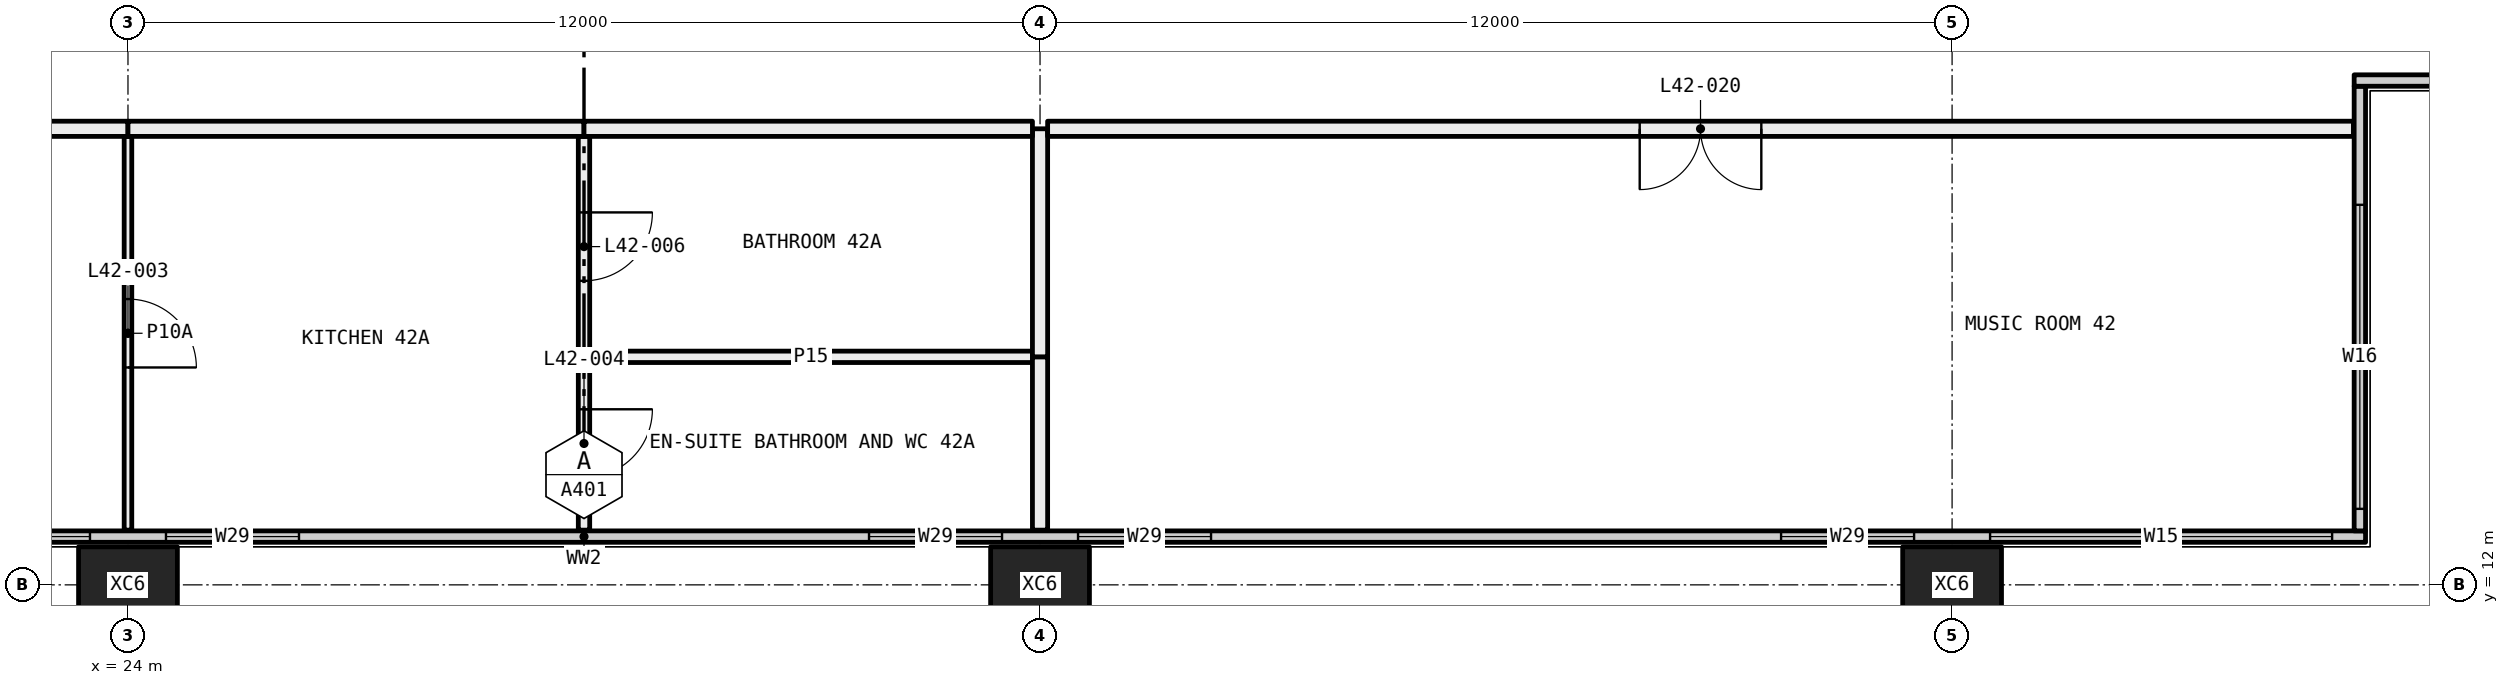
"""IFC4 building model, lengths in metres.
Left out: names, types, materials, properties, quantities, classifications, styles, units other than length and angle.
Written with IfcOpenShell. Run it as: python <this file> out.ifc"""

import sys

from ifc_helpers import new_model, si_unit, direction, frame, frame_2d, origin, origin_2d, place, context, subcontext, project, spatial, rectangle, hollow_rectangle, extrude, element, fill, save


model = new_model("IFC4")
c1 = context("Model", 3, precision=1e-05, world=origin(), true_north=direction((0.0, 1.0)))
c2 = subcontext(c1, "Body", "Model", "MODEL_VIEW")
j1 = project(units=[si_unit("LENGTHUNIT", "METRE"), si_unit("PLANEANGLEUNIT", "RADIAN")], contexts=[c1])
p1 = place(None, origin())
s1 = spatial("IfcSite", under=j1, at=p1, CompositionType="ELEMENT")
p2 = place(p1, origin())
s2 = spatial("IfcBuilding", under=s1, at=p2, CompositionType="ELEMENT")
p3 = place(p2, frame((0.0, 0.0, 161.7)))
s3 = spatial("IfcBuildingStorey", under=s2, at=p3, CompositionType="ELEMENT", Elevation=161.7)
for number, where, z_axis, x_axis in (
    (1, (24.0, 12.0, -0.4), (0.0, 0.0, 1.0), (1.0, 0.0, 0.0)),
    (2, (36.0, 12.0, -0.4), (0.0, 0.0, 1.0), (1.0, 0.0, 0.0)),
    (3, (48.0, 12.0, -0.4), (0.0, 0.0, 1.0), (1.0, 0.0, 0.0)),
):
    element("IfcColumn", number, at=place(p3, frame(where, z_axis=z_axis, x_axis=x_axis)), inside=s3, PredefinedType="COLUMN", context=c2, shape_type="SweptSolid", body=[
        extrude(hollow_rectangle(XDim=1.3, YDim=1.0, WallThickness=0.05, at=origin_2d()), origin(), (0.0, 0.0, 1.0), 3.45),
    ])
p4 = place(p3, frame((6.56, 12.635, 0.0), z_axis=(0.0, 0.0, 1.0), x_axis=(1.0, 0.0, 0.0)))
e4 = element("IfcWall", 4, at=p4, inside=s3, PredefinedType="ELEMENTEDWALL", context=c2, shape_type="SweptSolid", body=[
    extrude(rectangle(XDim=46.88, YDim=0.15, at=frame_2d((23.44, 0.0))), origin(), (0.0, 0.0, 1.0), 3.05),
])
p5 = place(p4, frame((0.44, 0.0, 0.45)))
e5 = element("IfcOpeningElement", 5, at=p5, cuts=e4, PredefinedType="OPENING", context=c2, shape_type="SweptSolid", body=[
    extrude(rectangle(XDim=4.5, YDim=2.55, at=frame_2d((2.25, 1.275))), frame((0.0, 0.085, 0.0), z_axis=(0.0, -1.0, 0.0), x_axis=(1.0, 0.0, 0.0)), (0.0, 0.0, 1.0), 0.17),
])
p6 = place(p4, frame((5.94, 0.0, 0.45)))
e6 = element("IfcOpeningElement", 6, at=p6, cuts=e4, PredefinedType="OPENING", context=c2, shape_type="SweptSolid", body=[
    extrude(rectangle(XDim=1.75, YDim=2.55, at=frame_2d((0.875, 1.275))), frame((0.0, 0.085, 0.0), z_axis=(0.0, -1.0, 0.0), x_axis=(1.0, 0.0, 0.0)), (0.0, 0.0, 1.0), 0.17),
])
p7 = place(p4, frame((15.19, 0.0, 0.45)))
e7 = element("IfcOpeningElement", 7, at=p7, cuts=e4, PredefinedType="OPENING", context=c2, shape_type="SweptSolid", body=[
    extrude(rectangle(XDim=1.75, YDim=2.55, at=frame_2d((0.875, 1.275))), frame((0.0, 0.085, 0.0), z_axis=(0.0, -1.0, 0.0), x_axis=(1.0, 0.0, 0.0)), (0.0, 0.0, 1.0), 0.17),
])
p8 = place(p4, frame((17.94, 0.0, 0.45)))
e8 = element("IfcOpeningElement", 8, at=p8, cuts=e4, PredefinedType="OPENING", context=c2, shape_type="SweptSolid", body=[
    extrude(rectangle(XDim=1.75, YDim=2.55, at=frame_2d((0.875, 1.275))), frame((0.0, 0.085, 0.0), z_axis=(0.0, -1.0, 0.0), x_axis=(1.0, 0.0, 0.0)), (0.0, 0.0, 1.0), 0.17),
])
p9 = place(p4, frame((27.19, 0.0, 0.45)))
e9 = element("IfcOpeningElement", 9, at=p9, cuts=e4, PredefinedType="OPENING", context=c2, shape_type="SweptSolid", body=[
    extrude(rectangle(XDim=1.75, YDim=2.55, at=frame_2d((0.875, 1.275))), frame((0.0, 0.085, 0.0), z_axis=(0.0, -1.0, 0.0), x_axis=(1.0, 0.0, 0.0)), (0.0, 0.0, 1.0), 0.17),
])
p10 = place(p4, frame((29.94, 0.0, 0.45)))
e10 = element("IfcOpeningElement", 10, at=p10, cuts=e4, PredefinedType="OPENING", context=c2, shape_type="SweptSolid", body=[
    extrude(rectangle(XDim=1.75, YDim=2.55, at=frame_2d((0.875, 1.275))), frame((0.0, 0.085, 0.0), z_axis=(0.0, -1.0, 0.0), x_axis=(1.0, 0.0, 0.0)), (0.0, 0.0, 1.0), 0.17),
])
p11 = place(p4, frame((39.19, 0.0, 0.45)))
e11 = element("IfcOpeningElement", 11, at=p11, cuts=e4, PredefinedType="OPENING", context=c2, shape_type="SweptSolid", body=[
    extrude(rectangle(XDim=1.75, YDim=2.55, at=frame_2d((0.875, 1.275))), frame((0.0, 0.085, 0.0), z_axis=(0.0, -1.0, 0.0), x_axis=(1.0, 0.0, 0.0)), (0.0, 0.0, 1.0), 0.17),
])
p12 = place(p4, frame((41.94, 0.0, 0.45)))
e12 = element("IfcOpeningElement", 12, at=p12, cuts=e4, PredefinedType="OPENING", context=c2, shape_type="SweptSolid", body=[
    extrude(rectangle(XDim=4.5, YDim=2.55, at=frame_2d((2.25, 1.275))), frame((0.0, 0.085, 0.0), z_axis=(0.0, -1.0, 0.0), x_axis=(1.0, 0.0, 0.0)), (0.0, 0.0, 1.0), 0.17),
])
p13 = place(p3, frame((53.365, 12.71, 0.0), z_axis=(0.0, 0.0, 1.0), x_axis=(0.0, 1.0, 0.0)))
e13 = element("IfcWall", 13, at=p13, inside=s3, PredefinedType="ELEMENTEDWALL", context=c2, shape_type="SweptSolid", body=[
    extrude(rectangle(XDim=5.85, YDim=0.15, at=frame_2d((2.925, 0.0))), origin(), (0.0, 0.0, 1.0), 3.05),
])
p14 = place(p13, frame((0.29, 0.0, 0.45)))
e14 = element("IfcOpeningElement", 14, at=p14, cuts=e13, PredefinedType="OPENING", context=c2, shape_type="SweptSolid", body=[
    extrude(rectangle(XDim=4.0, YDim=2.55, at=frame_2d((2.0, 1.275))), frame((0.0, 0.085, 0.0), z_axis=(0.0, -1.0, 0.0), x_axis=(1.0, 0.0, 0.0)), (0.0, 0.0, 1.0), 0.17),
])
p15 = place(p3, frame((53.29, 18.635, 0.0), z_axis=(0.0, 0.0, 1.0), x_axis=(1.0, 0.0, 0.0)))
e15 = element("IfcWall", 15, at=p15, inside=s3, PredefinedType="ELEMENTEDWALL", context=c2, shape_type="SweptSolid", body=[
    extrude(rectangle(XDim=6.15, YDim=0.15, at=frame_2d((3.075, 0.0))), origin(), (0.0, 0.0, 1.0), 3.05),
])
p16 = place(p15, frame((1.71, 0.0, 0.45)))
e16 = element("IfcOpeningElement", 16, at=p16, cuts=e15, PredefinedType="OPENING", context=c2, shape_type="SweptSolid", body=[
    extrude(rectangle(XDim=4.0, YDim=2.55, at=frame_2d((2.0, 1.275))), frame((0.0, 0.085, 0.0), z_axis=(0.0, -1.0, 0.0), x_axis=(1.0, 0.0, 0.0)), (0.0, 0.0, 1.0), 0.17),
])
p17 = place(p3, frame((24.0, 12.72, 0.0), z_axis=(0.0, 0.0, 1.0), x_axis=(0.0, 1.0, 0.0)))
e17 = element("IfcWall", 17, at=p17, inside=s3, PredefinedType="PARTITIONING", context=c2, shape_type="SweptSolid", body=[
    extrude(rectangle(XDim=5.18, YDim=0.1, at=frame_2d((2.59, 0.0))), origin(), (0.0, 0.0, 1.0), 3.05),
])
p18 = place(p17, frame((2.14, 0.0, 0.0)))
e18 = element("IfcOpeningElement", 18, at=p18, cuts=e17, PredefinedType="OPENING", context=c2, shape_type="SweptSolid", body=[
    extrude(rectangle(XDim=0.9, YDim=2.1, at=frame_2d((0.45, 1.05))), frame((0.0, 0.06, 0.0), z_axis=(0.0, -1.0, 0.0), x_axis=(1.0, 0.0, 0.0)), (0.0, 0.0, 1.0), 0.12),
])
p19 = place(p3, frame((24.0, 18.0, 0.0), z_axis=(0.0, 0.0, 1.0), x_axis=(-1.0, 0.0, 0.0)))
e19 = element("IfcWall", 19, at=p19, inside=s3, PredefinedType="PARTITIONING", context=c2, shape_type="SweptSolid", body=[
    extrude(rectangle(XDim=6.0, YDim=0.2, at=frame_2d((3.0, 0.0))), origin(), (0.0, 0.0, 1.0), 3.05),
])
p20 = place(p19, frame((2.5, 0.0, 0.0)))
e20 = element("IfcOpeningElement", 20, at=p20, cuts=e19, PredefinedType="OPENING", context=c2, shape_type="SweptSolid", body=[
    extrude(rectangle(XDim=1.0, YDim=2.1, at=frame_2d((0.5, 1.05))), frame((0.0, 0.11, 0.0), z_axis=(0.0, -1.0, 0.0), x_axis=(1.0, 0.0, 0.0)), (0.0, 0.0, 1.0), 0.22),
])
p21 = place(p3, frame((30.0, 12.72, 0.0), z_axis=(0.0, 0.0, 1.0), x_axis=(0.0, 1.0, 0.0)))
e21 = element("IfcWall", 21, at=p21, inside=s3, PredefinedType="PARTITIONING", context=c2, shape_type="SweptSolid", body=[
    extrude(rectangle(XDim=2.28, YDim=0.15, at=frame_2d((1.14, 0.0))), origin(), (0.0, 0.0, 1.0), 3.05),
])
p22 = place(p21, frame((0.69, 0.0, 0.0)))
e22 = element("IfcOpeningElement", 22, at=p22, cuts=e21, PredefinedType="OPENING", context=c2, shape_type="SweptSolid", body=[
    extrude(rectangle(XDim=0.9, YDim=2.1, at=frame_2d((0.45, 1.05))), frame((0.0, 0.085, 0.0), z_axis=(0.0, -1.0, 0.0), x_axis=(1.0, 0.0, 0.0)), (0.0, 0.0, 1.0), 0.17),
])
p23 = place(p3, frame((30.0, 15.0, 0.0), z_axis=(0.0, 0.0, 1.0), x_axis=(0.0, 1.0, 0.0)))
e23 = element("IfcWall", 23, at=p23, inside=s3, PredefinedType="PARTITIONING", context=c2, shape_type="SweptSolid", body=[
    extrude(rectangle(XDim=2.9, YDim=0.15, at=frame_2d((1.45, 0.0))), origin(), (0.0, 0.0, 1.0), 3.05),
])
p24 = place(p23, frame((1.0, 0.0, 0.0)))
e24 = element("IfcOpeningElement", 24, at=p24, cuts=e23, PredefinedType="OPENING", context=c2, shape_type="SweptSolid", body=[
    extrude(rectangle(XDim=0.9, YDim=2.1, at=frame_2d((0.45, 1.05))), frame((0.0, 0.085, 0.0), z_axis=(0.0, -1.0, 0.0), x_axis=(1.0, 0.0, 0.0)), (0.0, 0.0, 1.0), 0.17),
])
p25 = place(p3, frame((30.0, 18.0, 0.0), z_axis=(0.0, 0.0, 1.0), x_axis=(-1.0, 0.0, 0.0)))
e25 = element("IfcWall", 25, at=p25, inside=s3, PredefinedType="PARTITIONING", context=c2, shape_type="SweptSolid", body=[
    extrude(rectangle(XDim=6.0, YDim=0.2, at=frame_2d((3.0, 0.0))), origin(), (0.0, 0.0, 1.0), 3.05),
])
p26 = place(p3, frame((35.9, 15.0, 0.0), z_axis=(0.0, 0.0, 1.0), x_axis=(-1.0, 0.0, 0.0)))
e26 = element("IfcWall", 26, at=p26, inside=s3, PredefinedType="PARTITIONING", context=c2, shape_type="SweptSolid", body=[
    extrude(rectangle(XDim=5.825, YDim=0.15, at=frame_2d((2.913, 0.0))), origin(), (0.0, 0.0, 1.0), 3.05),
])
p27 = place(p3, frame((36.0, 12.72, 0.0), z_axis=(0.0, 0.0, 1.0), x_axis=(0.0, 1.0, 0.0)))
e27 = element("IfcWall", 27, at=p27, inside=s3, PredefinedType="PARTITIONING", context=c2, shape_type="SweptSolid", body=[
    extrude(rectangle(XDim=2.28, YDim=0.2, at=frame_2d((1.14, 0.0))), origin(), (0.0, 0.0, 1.0), 2.45),
])
p28 = place(p3, frame((36.0, 15.0, 0.0), z_axis=(0.0, 0.0, 1.0), x_axis=(0.0, 1.0, 0.0)))
e28 = element("IfcWall", 28, at=p28, inside=s3, PredefinedType="PARTITIONING", context=c2, shape_type="SweptSolid", body=[
    extrude(rectangle(XDim=3.0, YDim=0.2, at=frame_2d((1.5, 0.0))), origin(), (0.0, 0.0, 1.0), 2.45),
])
p29 = place(p3, frame((35.9, 18.0, 0.0), z_axis=(0.0, 0.0, 1.0), x_axis=(-1.0, 0.0, 0.0)))
e29 = element("IfcWall", 29, at=p29, inside=s3, PredefinedType="PARTITIONING", context=c2, shape_type="SweptSolid", body=[
    extrude(rectangle(XDim=5.9, YDim=0.2, at=frame_2d((2.95, 0.0))), origin(), (0.0, 0.0, 1.0), 3.05),
])
p30 = place(p3, frame((53.28, 18.0, 0.0), z_axis=(0.0, 0.0, 1.0), x_axis=(-1.0, 0.0, 0.0)))
e30 = element("IfcWall", 30, at=p30, inside=s3, PredefinedType="PARTITIONING", context=c2, shape_type="SweptSolid", body=[
    extrude(rectangle(XDim=17.18, YDim=0.2, at=frame_2d((8.59, 0.0))), origin(), (0.0, 0.0, 1.0), 3.05),
])
p31 = place(p30, frame((7.79, 0.0, 0.0)))
e31 = element("IfcOpeningElement", 31, at=p31, cuts=e30, PredefinedType="OPENING", context=c2, shape_type="SweptSolid", body=[
    extrude(rectangle(XDim=1.6, YDim=2.1, at=frame_2d((0.8, 1.05))), frame((0.0, 0.11, 0.0), z_axis=(0.0, -1.0, 0.0), x_axis=(1.0, 0.0, 0.0)), (0.0, 0.0, 1.0), 0.22),
])
p32 = place(p7, origin())
e32 = element("IfcWindow", 32, at=p32, inside=s3, PartitioningType="SINGLE_PANEL", PredefinedType="WINDOW", context=c2, shape_type="SweptSolid", body=[
    extrude(rectangle(XDim=1.75, YDim=2.55, at=frame_2d((0.875, 1.275))), frame((0.0, 0.03, 0.0), z_axis=(0.0, -1.0, 0.0), x_axis=(1.0, 0.0, 0.0)), (0.0, 0.0, 1.0), 0.06),
])
fill(e7, e32)
p33 = place(p8, origin())
e33 = element("IfcWindow", 33, at=p33, inside=s3, PartitioningType="SINGLE_PANEL", PredefinedType="WINDOW", context=c2, shape_type="SweptSolid", body=[
    extrude(rectangle(XDim=1.75, YDim=2.55, at=frame_2d((0.875, 1.275))), frame((0.0, 0.03, 0.0), z_axis=(0.0, -1.0, 0.0), x_axis=(1.0, 0.0, 0.0)), (0.0, 0.0, 1.0), 0.06),
])
fill(e8, e33)
p34 = place(p9, origin())
e34 = element("IfcWindow", 34, at=p34, inside=s3, PartitioningType="SINGLE_PANEL", PredefinedType="WINDOW", context=c2, shape_type="SweptSolid", body=[
    extrude(rectangle(XDim=1.75, YDim=2.55, at=frame_2d((0.875, 1.275))), frame((0.0, 0.03, 0.0), z_axis=(0.0, -1.0, 0.0), x_axis=(1.0, 0.0, 0.0)), (0.0, 0.0, 1.0), 0.06),
])
fill(e9, e34)
p35 = place(p10, origin())
e35 = element("IfcWindow", 35, at=p35, inside=s3, PartitioningType="SINGLE_PANEL", PredefinedType="WINDOW", context=c2, shape_type="SweptSolid", body=[
    extrude(rectangle(XDim=1.75, YDim=2.55, at=frame_2d((0.875, 1.275))), frame((0.0, 0.03, 0.0), z_axis=(0.0, -1.0, 0.0), x_axis=(1.0, 0.0, 0.0)), (0.0, 0.0, 1.0), 0.06),
])
fill(e10, e35)
p36 = place(p11, origin())
e36 = element("IfcWindow", 36, at=p36, inside=s3, PartitioningType="SINGLE_PANEL", PredefinedType="WINDOW", context=c2, shape_type="SweptSolid", body=[
    extrude(rectangle(XDim=1.75, YDim=2.55, at=frame_2d((0.875, 1.275))), frame((0.0, 0.03, 0.0), z_axis=(0.0, -1.0, 0.0), x_axis=(1.0, 0.0, 0.0)), (0.0, 0.0, 1.0), 0.06),
])
fill(e11, e36)
p37 = place(p12, origin())
e37 = element("IfcWindow", 37, at=p37, inside=s3, PartitioningType="SINGLE_PANEL", PredefinedType="WINDOW", context=c2, shape_type="SweptSolid", body=[
    extrude(rectangle(XDim=4.5, YDim=2.55, at=frame_2d((2.25, 1.275))), frame((0.0, 0.03, 0.0), z_axis=(0.0, -1.0, 0.0), x_axis=(1.0, 0.0, 0.0)), (0.0, 0.0, 1.0), 0.06),
])
fill(e12, e37)
p38 = place(p14, origin())
e38 = element("IfcWindow", 38, at=p38, inside=s3, PartitioningType="SINGLE_PANEL", PredefinedType="WINDOW", context=c2, shape_type="SweptSolid", body=[
    extrude(rectangle(XDim=4.0, YDim=2.55, at=frame_2d((2.0, 1.275))), frame((0.0, 0.03, 0.0), z_axis=(0.0, -1.0, 0.0), x_axis=(1.0, 0.0, 0.0)), (0.0, 0.0, 1.0), 0.06),
])
fill(e14, e38)
p39 = place(p18, frame((0.9, 0.0, 0.0), x_axis=(-1.0, 0.0, 0.0)))
e39 = element("IfcDoor", 39, at=p39, inside=s3, OperationType="SINGLE_SWING_LEFT", PredefinedType="DOOR", context=c2, shape_type="SweptSolid", body=[
    extrude(rectangle(XDim=0.9, YDim=2.1, at=frame_2d((0.45, 1.05))), frame((0.0, 0.025, 0.0), z_axis=(0.0, -1.0, 0.0), x_axis=(1.0, 0.0, 0.0)), (0.0, 0.0, 1.0), 0.05),
])
fill(e18, e39)
p40 = place(p22, frame((0.9, 0.0, 0.0), x_axis=(-1.0, 0.0, 0.0)))
e40 = element("IfcDoor", 40, at=p40, inside=s3, OperationType="SINGLE_SWING_RIGHT", PredefinedType="DOOR", context=c2, shape_type="SweptSolid", body=[
    extrude(rectangle(XDim=0.9, YDim=2.1, at=frame_2d((0.45, 1.05))), frame((0.0, 0.025, 0.0), z_axis=(0.0, -1.0, 0.0), x_axis=(1.0, 0.0, 0.0)), (0.0, 0.0, 1.0), 0.05),
])
fill(e22, e40)
p41 = place(p24, frame((0.9, 0.0, 0.0), x_axis=(-1.0, 0.0, 0.0)))
e41 = element("IfcDoor", 41, at=p41, inside=s3, OperationType="SINGLE_SWING_RIGHT", PredefinedType="DOOR", context=c2, shape_type="SweptSolid", body=[
    extrude(rectangle(XDim=0.9, YDim=2.1, at=frame_2d((0.45, 1.05))), frame((0.0, 0.025, 0.0), z_axis=(0.0, -1.0, 0.0), x_axis=(1.0, 0.0, 0.0)), (0.0, 0.0, 1.0), 0.05),
])
fill(e24, e41)
p42 = place(p31, origin())
e42 = element("IfcDoor", 42, at=p42, inside=s3, OperationType="DOUBLE_DOOR_SINGLE_SWING", PredefinedType="DOOR", context=c2, shape_type="SweptSolid", body=[
    extrude(rectangle(XDim=1.6, YDim=2.1, at=frame_2d((0.8, 1.05))), frame((0.0, 0.025, 0.0), z_axis=(0.0, -1.0, 0.0), x_axis=(1.0, 0.0, 0.0)), (0.0, 0.0, 1.0), 0.05),
])
fill(e31, e42)
save(model, sys.argv[1])
